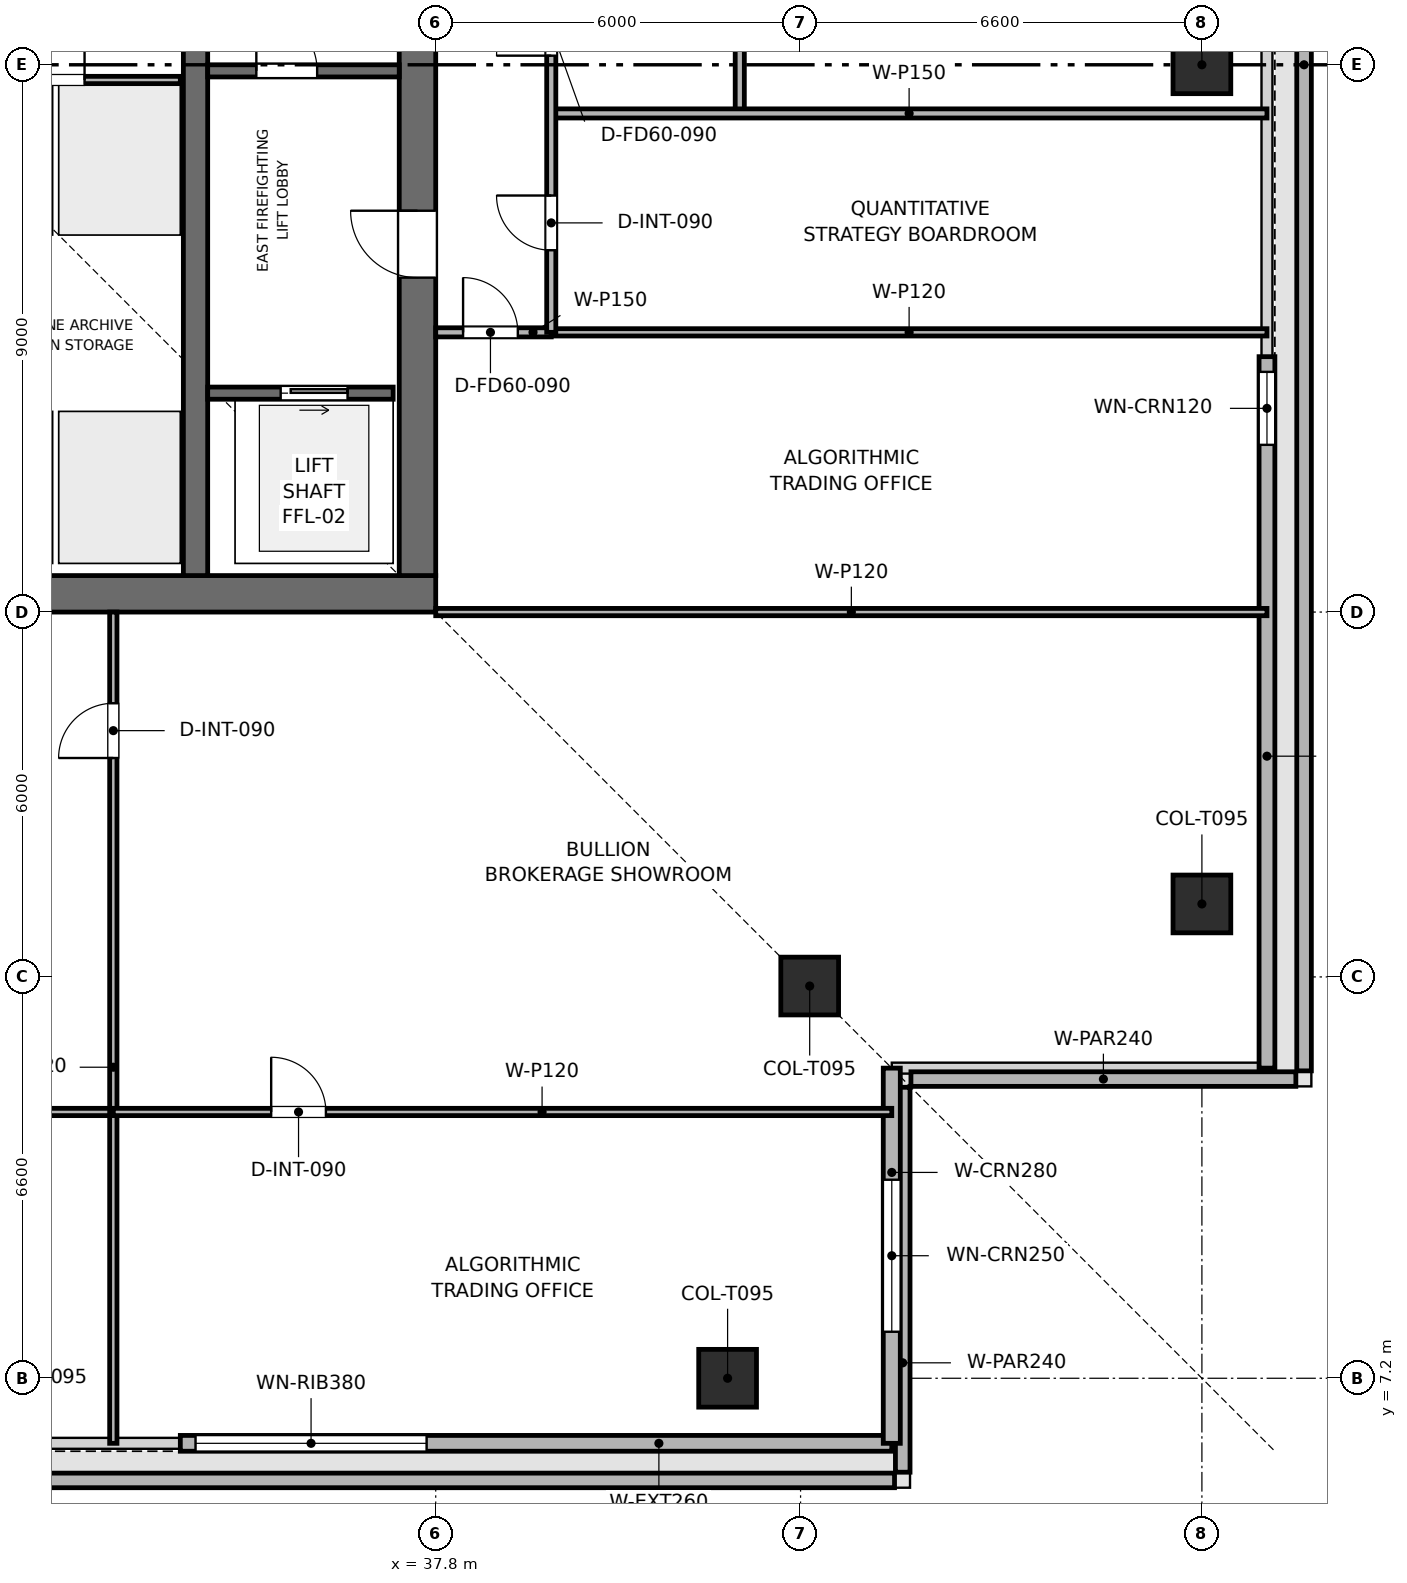
"""IFC4 building model, lengths in metres.
Left out: names, types, materials, properties, quantities, classifications, styles, units other than length and angle.
Written with IfcOpenShell. Run it as: python <this file> out.ifc"""

import sys

from ifc_helpers import new_model, si_unit, direction, frame, frame_2d, origin, origin_2d, place, context, subcontext, project, spatial, rectangle, extrude, element, fill, save


model = new_model("IFC4")
c1 = context("Model", 3, precision=1e-05, world=origin(), true_north=direction((0.0, 1.0)))
c2 = subcontext(c1, "Body", "Model", "MODEL_VIEW")
j1 = project(units=[si_unit("LENGTHUNIT", "METRE"), si_unit("PLANEANGLEUNIT", "RADIAN")], contexts=[c1])
p1 = place(None, origin())
s1 = spatial("IfcSite", under=j1, at=p1, CompositionType="ELEMENT")
p2 = place(p1, origin())
s2 = spatial("IfcBuilding", under=s1, at=p2, CompositionType="ELEMENT")
p3 = place(p2, frame((0.0, 0.0, 295.5)))
s3 = spatial("IfcBuildingStorey", under=s2, at=p3, CompositionType="ELEMENT", Elevation=295.5)
p4 = place(p3, frame((19.8, 20.1, 0.0), z_axis=(0.0, 0.0, 1.0), x_axis=(1.0, 0.0, 0.0)))
e1 = element("IfcWall", 1, at=p4, inside=s3, PredefinedType="SHEAR", context=c2, shape_type="SweptSolid", body=[
    extrude(rectangle(XDim=18.0, YDim=0.6, at=frame_2d((9.0, 0.0))), origin(), (0.0, 0.0, 1.0), 3.75),
])
p5 = place(p3, frame((37.5, 20.4, 0.0), z_axis=(0.0, 0.0, 1.0), x_axis=(0.0, 1.0, 0.0)))
e2 = element("IfcWall", 2, at=p5, inside=s3, PredefinedType="SHEAR", context=c2, shape_type="SweptSolid", body=[
    extrude(rectangle(XDim=16.8, YDim=0.6, at=frame_2d((8.4, 0.0))), origin(), (0.0, 0.0, 1.0), 3.75),
])
p6 = place(p5, frame((4.9, 0.0, 0.0)))
e3 = element("IfcOpeningElement", 3, at=p6, cuts=e2, PredefinedType="OPENING", context=c2, shape_type="SweptSolid", body=[
    extrude(rectangle(XDim=1.1, YDim=2.15, at=frame_2d((0.55, 1.075))), frame((0.0, 0.31, 0.0), z_axis=(0.0, -1.0, 0.0), x_axis=(1.0, 0.0, 0.0)), (0.0, 0.0, 1.0), 0.62),
])
p7 = place(p3, frame((33.85, 20.4, 0.0), z_axis=(0.0, 0.0, 1.0), x_axis=(0.0, 1.0, 0.0)))
e4 = element("IfcWall", 4, at=p7, inside=s3, PredefinedType="SHEAR", context=c2, shape_type="SweptSolid", body=[
    extrude(rectangle(XDim=16.8, YDim=0.4, at=frame_2d((8.4, 0.0))), origin(), (0.0, 0.0, 1.0), 3.75),
])
for number, where, z_axis, x_axis in (
    (5, (42.6, 7.2, 0.003), (0.0, 0.0, 1.0), (1.0, 0.0, 0.0)),
    (6, (50.4, 15.0, 0.003), (0.0, 0.0, 1.0), (1.0, 0.0, 0.0)),
    (7, (50.4, 28.8, 0.003), (0.0, 0.0, 1.0), (1.0, 0.0, 0.0)),
    (8, (43.95, 13.65, 0.003), (0.0, 0.0, 1.0), (1.0, 0.0, 0.0)),
):
    element("IfcColumn", number, at=place(p3, frame(where, z_axis=z_axis, x_axis=x_axis)), inside=s3, PredefinedType="COLUMN", context=c2, shape_type="SweptSolid", body=[
        extrude(rectangle(XDim=0.95, YDim=0.95, at=origin_2d()), origin(), (0.0, 0.0, 1.0), 3.504),
    ])
p8 = place(p3, frame((12.255, 5.52, 0.0), z_axis=(0.0, 0.0, 1.0), x_axis=(1.0, 0.0, 0.0)))
e9 = element("IfcWall", 9, at=p8, inside=s3, PredefinedType="PARAPET", context=c2, shape_type="SweptSolid", body=[
    extrude(rectangle(XDim=33.09, YDim=0.24, at=frame_2d((16.545, 0.0))), origin(), (0.0, 0.0, 1.0), 1.2),
])
for number, where, z_axis, x_axis in (
    (10, (45.48, 5.655, 0.0), (0.0, 0.0, 1.0), (0.0, 1.0, 0.0)),
    (11, (45.615, 12.12, 0.0), (0.0, 0.0, 1.0), (1.0, 0.0, 0.0)),
):
    element("IfcWall", number, at=place(p3, frame(where, z_axis=z_axis, x_axis=x_axis)), inside=s3, PredefinedType="PARAPET", context=c2, shape_type="SweptSolid", body=[
        extrude(rectangle(XDim=6.33, YDim=0.24, at=frame_2d((3.165, 0.0))), origin(), (0.0, 0.0, 1.0), 1.2),
    ])
p9 = place(p3, frame((52.08, 12.255, 0.0), z_axis=(0.0, 0.0, 1.0), x_axis=(0.0, 1.0, 0.0)))
e12 = element("IfcWall", 12, at=p9, inside=s3, PredefinedType="PARAPET", context=c2, shape_type="SweptSolid", body=[
    extrude(rectangle(XDim=33.09, YDim=0.24, at=frame_2d((16.545, 0.0))), origin(), (0.0, 0.0, 1.0), 1.2),
])
p10 = place(p3, frame((45.3, 6.13, 0.0), z_axis=(0.0, 0.0, 1.0), x_axis=(-1.0, 0.0, 0.0)))
e13 = element("IfcWall", 13, at=p10, inside=s3, PredefinedType="SOLIDWALL", context=c2, shape_type="SweptSolid", body=[
    extrude(rectangle(XDim=11.7, YDim=0.26, at=frame_2d((5.85, 0.0))), origin(), (0.0, 0.0, 1.0), 3.51),
])
p11 = place(p10, frame((7.65, 0.0, 0.9)))
e14 = element("IfcOpeningElement", 14, at=p11, cuts=e13, PredefinedType="OPENING", context=c2, shape_type="SweptSolid", body=[
    extrude(rectangle(XDim=3.8, YDim=1.9, at=frame_2d((1.9, 0.95))), frame((0.0, 0.14, 0.0), z_axis=(0.0, -1.0, 0.0), x_axis=(1.0, 0.0, 0.0)), (0.0, 0.0, 1.0), 0.28),
])
p12 = place(p3, frame((51.47, 24.0, 0.0), z_axis=(0.0, 0.0, 1.0), x_axis=(0.0, -1.0, 0.0)))
e15 = element("IfcWall", 15, at=p12, inside=s3, PredefinedType="SOLIDWALL", context=c2, shape_type="SweptSolid", body=[
    extrude(rectangle(XDim=11.7, YDim=0.26, at=frame_2d((5.85, 0.0))), origin(), (0.0, 0.0, 1.0), 3.51),
])
p13 = place(p12, frame((0.25, 0.0, 0.9)))
e16 = element("IfcOpeningElement", 16, at=p13, cuts=e15, PredefinedType="OPENING", context=c2, shape_type="SweptSolid", body=[
    extrude(rectangle(XDim=1.2, YDim=2.1, at=frame_2d((0.6, 1.05))), frame((0.0, 0.14, 0.0), z_axis=(0.0, -1.0, 0.0), x_axis=(1.0, 0.0, 0.0)), (0.0, 0.0, 1.0), 0.28),
])
p14 = place(p3, frame((45.3, 12.3, 0.0), z_axis=(0.0, 0.0, 1.0), x_axis=(0.0, -1.0, 0.0)))
e17 = element("IfcWall", 17, at=p14, inside=s3, PredefinedType="SOLIDWALL", context=c2, shape_type="SweptSolid", body=[
    extrude(rectangle(XDim=6.17, YDim=0.28, at=frame_2d((3.085, 0.0))), origin(), (0.0, 0.0, 1.0), 3.51),
])
p15 = place(p14, frame((1.835, 0.0, 0.9)))
e18 = element("IfcOpeningElement", 18, at=p15, cuts=e17, PredefinedType="OPENING", context=c2, shape_type="SweptSolid", body=[
    extrude(rectangle(XDim=2.5, YDim=1.9, at=frame_2d((1.25, 0.95))), frame((0.0, 0.15, 0.0), z_axis=(0.0, -1.0, 0.0), x_axis=(1.0, 0.0, 0.0)), (0.0, 0.0, 1.0), 0.3),
])
p16 = place(p3, frame((34.05, 28.7, 0.0), z_axis=(0.0, 0.0, 1.0), x_axis=(1.0, 0.0, 0.0)))
e19 = element("IfcWall", 19, at=p16, inside=s3, PredefinedType="SHEAR", context=c2, shape_type="SweptSolid", body=[
    extrude(rectangle(XDim=3.15, YDim=0.2, at=frame_2d((1.575, 0.0))), origin(), (0.0, 0.0, 1.0), 3.51),
])
p17 = place(p16, frame((0.8, 0.0, 0.0)))
e20 = element("IfcOpeningElement", 20, at=p17, cuts=e19, PredefinedType="OPENING", context=c2, shape_type="SweptSolid", body=[
    extrude(rectangle(XDim=1.0, YDim=2.1, at=frame_2d((0.5, 1.05))), frame((0.0, 0.11, 0.0), z_axis=(0.0, -1.0, 0.0), x_axis=(1.0, 0.0, 0.0)), (0.0, 0.0, 1.0), 0.22),
])
p18 = place(p3, frame((34.05, 23.4, 0.0), z_axis=(0.0, 0.0, 1.0), x_axis=(1.0, 0.0, 0.0)))
e21 = element("IfcWall", 21, at=p18, inside=s3, PredefinedType="SHEAR", context=c2, shape_type="SweptSolid", body=[
    extrude(rectangle(XDim=3.05, YDim=0.2, at=frame_2d((1.525, 0.0))), origin(), (0.0, 0.0, 1.0), 3.51),
])
p19 = place(p18, frame((1.2, 0.0, 0.0)))
e22 = element("IfcOpeningElement", 22, at=p19, cuts=e21, PredefinedType="OPENING", context=c2, shape_type="SweptSolid", body=[
    extrude(rectangle(XDim=1.1, YDim=2.15, at=frame_2d((0.55, 1.075))), frame((0.0, 0.11, 0.0), z_axis=(0.0, -1.0, 0.0), x_axis=(1.0, 0.0, 0.0)), (0.0, 0.0, 1.0), 0.22),
])
p20 = place(p3, frame((29.55, 28.55, 0.0), z_axis=(0.0, 0.0, 1.0), x_axis=(1.0, 0.0, 0.0)))
e23 = element("IfcWall", 23, at=p20, inside=s3, PredefinedType="PARTITIONING", context=c2, shape_type="SweptSolid", body=[
    extrude(rectangle(XDim=4.05, YDim=0.12, at=frame_2d((2.025, 0.0))), origin(), (0.0, 0.0, 1.0), 3.51),
])
p21 = place(p20, frame((1.575, 0.0, 0.0)))
e24 = element("IfcOpeningElement", 24, at=p21, cuts=e23, PredefinedType="OPENING", context=c2, shape_type="SweptSolid", body=[
    extrude(rectangle(XDim=0.9, YDim=2.1, at=frame_2d((0.45, 1.05))), frame((0.0, 0.07, 0.0), z_axis=(0.0, -1.0, 0.0), x_axis=(1.0, 0.0, 0.0)), (0.0, 0.0, 1.0), 0.14),
])
p22 = place(p3, frame((22.217, 11.579, 0.0), z_axis=(0.0, 0.0, 1.0), x_axis=(1.0, 0.0, 0.0)))
e25 = element("IfcWall", 25, at=p22, inside=s3, PredefinedType="PARTITIONING", context=c2, shape_type="SweptSolid", body=[
    extrude(rectangle(XDim=10.281, YDim=0.12, at=frame_2d((5.141, 0.0))), origin(), (0.0, 0.0, 1.0), 3.095),
])
p23 = place(p22, frame((0.2, 0.0, 0.0)))
e26 = element("IfcOpeningElement", 26, at=p23, cuts=e25, PredefinedType="OPENING", context=c2, shape_type="SweptSolid", body=[
    extrude(rectangle(XDim=0.9, YDim=2.1, at=frame_2d((0.45, 1.05))), frame((0.0, 0.07, 0.0), z_axis=(0.0, -1.0, 0.0), x_axis=(1.0, 0.0, 0.0)), (0.0, 0.0, 1.0), 0.14),
])
p24 = place(p3, frame((32.498, 6.13, 0.0), z_axis=(0.0, 0.0, 1.0), x_axis=(0.0, 1.0, 0.0)))
e27 = element("IfcWall", 27, at=p24, inside=s3, PredefinedType="PARTITIONING", context=c2, shape_type="SweptSolid", body=[
    extrude(rectangle(XDim=13.67, YDim=0.12, at=frame_2d((6.835, 0.0))), origin(), (0.0, 0.0, 1.0), 3.135),
])
p25 = place(p24, frame((11.27, 0.0, 0.0)))
e28 = element("IfcOpeningElement", 28, at=p25, cuts=e27, PredefinedType="OPENING", context=c2, shape_type="SweptSolid", body=[
    extrude(rectangle(XDim=0.9, YDim=2.1, at=frame_2d((0.45, 1.05))), frame((0.0, 0.07, 0.0), z_axis=(0.0, -1.0, 0.0), x_axis=(1.0, 0.0, 0.0)), (0.0, 0.0, 1.0), 0.14),
])
p26 = place(p3, frame((32.498, 11.579, 0.0), z_axis=(0.0, 0.0, 1.0), x_axis=(1.0, 0.0, 0.0)))
e29 = element("IfcWall", 29, at=p26, inside=s3, PredefinedType="PARTITIONING", context=c2, shape_type="SweptSolid", body=[
    extrude(rectangle(XDim=12.802, YDim=0.12, at=frame_2d((6.401, 0.0))), origin(), (0.0, 0.0, 1.0), 3.095),
])
p27 = place(p26, frame((2.596, 0.0, 0.0)))
e30 = element("IfcOpeningElement", 30, at=p27, cuts=e29, PredefinedType="OPENING", context=c2, shape_type="SweptSolid", body=[
    extrude(rectangle(XDim=0.9, YDim=2.1, at=frame_2d((0.45, 1.05))), frame((0.0, 0.07, 0.0), z_axis=(0.0, -1.0, 0.0), x_axis=(1.0, 0.0, 0.0)), (0.0, 0.0, 1.0), 0.14),
])
p28 = place(p3, frame((37.8, 19.8, 0.0), z_axis=(0.0, 0.0, 1.0), x_axis=(1.0, 0.0, 0.0)))
e31 = element("IfcWall", 31, at=p28, inside=s3, PredefinedType="PARTITIONING", context=c2, shape_type="SweptSolid", body=[
    extrude(rectangle(XDim=13.67, YDim=0.12, at=frame_2d((6.835, 0.0))), origin(), (0.0, 0.0, 1.0), 3.095),
])
p29 = place(p3, frame((37.8, 24.4, 0.0), z_axis=(0.0, 0.0, 1.0), x_axis=(1.0, 0.0, 0.0)))
e32 = element("IfcWall", 32, at=p29, inside=s3, PredefinedType="PARTITIONING", context=c2, shape_type="SweptSolid", body=[
    extrude(rectangle(XDim=1.9, YDim=0.15, at=frame_2d((0.95, 0.0))), origin(), (0.0, 0.0, 1.0), 3.51),
])
p30 = place(p29, frame((0.45, 0.0, 0.0)))
e33 = element("IfcOpeningElement", 33, at=p30, cuts=e32, PredefinedType="OPENING", context=c2, shape_type="SweptSolid", body=[
    extrude(rectangle(XDim=0.9, YDim=2.1, at=frame_2d((0.45, 1.05))), frame((0.0, 0.085, 0.0), z_axis=(0.0, -1.0, 0.0), x_axis=(1.0, 0.0, 0.0)), (0.0, 0.0, 1.0), 0.17),
])
p31 = place(p3, frame((39.7, 24.4, 0.0), z_axis=(0.0, 0.0, 1.0), x_axis=(1.0, 0.0, 0.0)))
e34 = element("IfcWall", 34, at=p31, inside=s3, PredefinedType="PARTITIONING", context=c2, shape_type="SweptSolid", body=[
    extrude(rectangle(XDim=11.77, YDim=0.12, at=frame_2d((5.885, 0.0))), origin(), (0.0, 0.0, 1.0), 3.135),
])
p32 = place(p3, frame((42.8, 28.0, 0.0), z_axis=(0.0, 0.0, 1.0), x_axis=(0.0, 1.0, 0.0)))
e35 = element("IfcWall", 35, at=p32, inside=s3, PredefinedType="PARTITIONING", context=c2, shape_type="SweptSolid", body=[
    extrude(rectangle(XDim=11.7, YDim=0.15, at=frame_2d((5.85, 0.0))), origin(), (0.0, 0.0, 1.0), 3.095),
])
p33 = place(p32, frame((9.6, 0.0, 0.0)))
e36 = element("IfcOpeningElement", 36, at=p33, cuts=e35, PredefinedType="OPENING", context=c2, shape_type="SweptSolid", body=[
    extrude(rectangle(XDim=0.9, YDim=2.1, at=frame_2d((0.45, 1.05))), frame((0.0, 0.085, 0.0), z_axis=(0.0, -1.0, 0.0), x_axis=(1.0, 0.0, 0.0)), (0.0, 0.0, 1.0), 0.17),
])
p34 = place(p3, frame((39.7, 28.0, 0.0), z_axis=(0.0, 0.0, 1.0), x_axis=(1.0, 0.0, 0.0)))
e37 = element("IfcWall", 37, at=p34, inside=s3, PredefinedType="PARTITIONING", context=c2, shape_type="SweptSolid", body=[
    extrude(rectangle(XDim=11.77, YDim=0.15, at=frame_2d((5.885, 0.0))), origin(), (0.0, 0.0, 1.0), 3.135),
])
p35 = place(p3, frame((39.7, 24.4, 0.0), z_axis=(0.0, 0.0, 1.0), x_axis=(0.0, 1.0, 0.0)))
e38 = element("IfcWall", 38, at=p35, inside=s3, PredefinedType="PARTITIONING", context=c2, shape_type="SweptSolid", body=[
    extrude(rectangle(XDim=15.3, YDim=0.15, at=frame_2d((7.65, 0.0))), origin(), (0.0, 0.0, 1.0), 3.095),
])
p36 = place(p35, frame((1.35, 0.0, 0.0)))
e39 = element("IfcOpeningElement", 39, at=p36, cuts=e38, PredefinedType="OPENING", context=c2, shape_type="SweptSolid", body=[
    extrude(rectangle(XDim=0.9, YDim=2.1, at=frame_2d((0.45, 1.05))), frame((0.0, 0.085, 0.0), z_axis=(0.0, -1.0, 0.0), x_axis=(1.0, 0.0, 0.0)), (0.0, 0.0, 1.0), 0.17),
])
p37 = place(p35, frame((4.55, 0.0, 0.0)))
e40 = element("IfcOpeningElement", 40, at=p37, cuts=e38, PredefinedType="OPENING", context=c2, shape_type="SweptSolid", body=[
    extrude(rectangle(XDim=0.9, YDim=2.1, at=frame_2d((0.45, 1.05))), frame((0.0, 0.085, 0.0), z_axis=(0.0, -1.0, 0.0), x_axis=(1.0, 0.0, 0.0)), (0.0, 0.0, 1.0), 0.17),
])
p38 = place(p35, frame((7.45, 0.0, 0.0)))
e41 = element("IfcOpeningElement", 41, at=p38, cuts=e38, PredefinedType="OPENING", context=c2, shape_type="SweptSolid", body=[
    extrude(rectangle(XDim=0.9, YDim=2.1, at=frame_2d((0.45, 1.05))), frame((0.0, 0.085, 0.0), z_axis=(0.0, -1.0, 0.0), x_axis=(1.0, 0.0, 0.0)), (0.0, 0.0, 1.0), 0.17),
])
p39 = place(p35, frame((10.2, 0.0, 0.0)))
e42 = element("IfcOpeningElement", 42, at=p39, cuts=e38, PredefinedType="OPENING", context=c2, shape_type="SweptSolid", body=[
    extrude(rectangle(XDim=0.95, YDim=2.1, at=frame_2d((0.475, 1.05))), frame((0.0, 0.085, 0.0), z_axis=(0.0, -1.0, 0.0), x_axis=(1.0, 0.0, 0.0)), (0.0, 0.0, 1.0), 0.17),
])
p40 = place(p35, frame((13.2, 0.0, 0.0)))
e43 = element("IfcOpeningElement", 43, at=p40, cuts=e38, PredefinedType="OPENING", context=c2, shape_type="SweptSolid", body=[
    extrude(rectangle(XDim=0.9, YDim=2.1, at=frame_2d((0.45, 1.05))), frame((0.0, 0.085, 0.0), z_axis=(0.0, -1.0, 0.0), x_axis=(1.0, 0.0, 0.0)), (0.0, 0.0, 1.0), 0.17),
])
p41 = place(p11, origin())
e44 = element("IfcWindow", 44, at=p41, inside=s3, PartitioningType="SINGLE_PANEL", PredefinedType="WINDOW", context=c2, shape_type="SweptSolid", body=[
    extrude(rectangle(XDim=3.8, YDim=1.9, at=frame_2d((1.9, 0.95))), frame((0.0, 0.03, 0.0), z_axis=(0.0, -1.0, 0.0), x_axis=(1.0, 0.0, 0.0)), (0.0, 0.0, 1.0), 0.06),
])
fill(e14, e44)
p42 = place(p13, origin())
e45 = element("IfcWindow", 45, at=p42, inside=s3, PartitioningType="SINGLE_PANEL", PredefinedType="WINDOW", context=c2, shape_type="SweptSolid", body=[
    extrude(rectangle(XDim=1.2, YDim=2.1, at=frame_2d((0.6, 1.05))), frame((0.0, 0.03, 0.0), z_axis=(0.0, -1.0, 0.0), x_axis=(1.0, 0.0, 0.0)), (0.0, 0.0, 1.0), 0.06),
])
fill(e16, e45)
p43 = place(p15, origin())
e46 = element("IfcWindow", 46, at=p43, inside=s3, PartitioningType="SINGLE_PANEL", PredefinedType="WINDOW", context=c2, shape_type="SweptSolid", body=[
    extrude(rectangle(XDim=2.5, YDim=1.9, at=frame_2d((1.25, 0.95))), frame((0.0, 0.03, 0.0), z_axis=(0.0, -1.0, 0.0), x_axis=(1.0, 0.0, 0.0)), (0.0, 0.0, 1.0), 0.06),
])
fill(e18, e46)
p44 = place(p17, origin())
e47 = element("IfcDoor", 47, at=p44, inside=s3, OperationType="SINGLE_SWING_LEFT", PredefinedType="DOOR", context=c2, shape_type="SweptSolid", body=[
    extrude(rectangle(XDim=1.0, YDim=2.1, at=frame_2d((0.5, 1.05))), frame((0.0, 0.025, 0.0), z_axis=(0.0, -1.0, 0.0), x_axis=(1.0, 0.0, 0.0)), (0.0, 0.0, 1.0), 0.05),
])
fill(e20, e47)
p45 = place(p19, origin())
e48 = element("IfcDoor", 48, at=p45, inside=s3, OperationType="SLIDING_TO_RIGHT", PredefinedType="DOOR", context=c2, shape_type="SweptSolid", body=[
    extrude(rectangle(XDim=1.1, YDim=2.15, at=frame_2d((0.55, 1.075))), frame((0.0, 0.025, 0.0), z_axis=(0.0, -1.0, 0.0), x_axis=(1.0, 0.0, 0.0)), (0.0, 0.0, 1.0), 0.05),
])
fill(e22, e48)
p46 = place(p21, origin())
e49 = element("IfcDoor", 49, at=p46, inside=s3, OperationType="SINGLE_SWING_RIGHT", PredefinedType="DOOR", context=c2, shape_type="SweptSolid", body=[
    extrude(rectangle(XDim=0.9, YDim=2.1, at=frame_2d((0.45, 1.05))), frame((0.0, 0.025, 0.0), z_axis=(0.0, -1.0, 0.0), x_axis=(1.0, 0.0, 0.0)), (0.0, 0.0, 1.0), 0.05),
])
fill(e24, e49)
p47 = place(p25, origin())
e50 = element("IfcDoor", 50, at=p47, inside=s3, OperationType="SINGLE_SWING_LEFT", PredefinedType="DOOR", context=c2, shape_type="SweptSolid", body=[
    extrude(rectangle(XDim=0.9, YDim=2.1, at=frame_2d((0.45, 1.05))), frame((0.0, 0.025, 0.0), z_axis=(0.0, -1.0, 0.0), x_axis=(1.0, 0.0, 0.0)), (0.0, 0.0, 1.0), 0.05),
])
fill(e28, e50)
p48 = place(p27, origin())
e51 = element("IfcDoor", 51, at=p48, inside=s3, OperationType="SINGLE_SWING_LEFT", PredefinedType="DOOR", context=c2, shape_type="SweptSolid", body=[
    extrude(rectangle(XDim=0.9, YDim=2.1, at=frame_2d((0.45, 1.05))), frame((0.0, 0.025, 0.0), z_axis=(0.0, -1.0, 0.0), x_axis=(1.0, 0.0, 0.0)), (0.0, 0.0, 1.0), 0.05),
])
fill(e30, e51)
p49 = place(p30, origin())
e52 = element("IfcDoor", 52, at=p49, inside=s3, OperationType="SINGLE_SWING_LEFT", PredefinedType="DOOR", context=c2, shape_type="SweptSolid", body=[
    extrude(rectangle(XDim=0.9, YDim=2.1, at=frame_2d((0.45, 1.05))), frame((0.0, 0.025, 0.0), z_axis=(0.0, -1.0, 0.0), x_axis=(1.0, 0.0, 0.0)), (0.0, 0.0, 1.0), 0.05),
])
fill(e33, e52)
p50 = place(p36, origin())
e53 = element("IfcDoor", 53, at=p50, inside=s3, OperationType="SINGLE_SWING_RIGHT", PredefinedType="DOOR", context=c2, shape_type="SweptSolid", body=[
    extrude(rectangle(XDim=0.9, YDim=2.1, at=frame_2d((0.45, 1.05))), frame((0.0, 0.025, 0.0), z_axis=(0.0, -1.0, 0.0), x_axis=(1.0, 0.0, 0.0)), (0.0, 0.0, 1.0), 0.05),
])
fill(e39, e53)
p51 = place(p37, origin())
e54 = element("IfcDoor", 54, at=p51, inside=s3, OperationType="SINGLE_SWING_LEFT", PredefinedType="DOOR", context=c2, shape_type="SweptSolid", body=[
    extrude(rectangle(XDim=0.9, YDim=2.1, at=frame_2d((0.45, 1.05))), frame((0.0, 0.025, 0.0), z_axis=(0.0, -1.0, 0.0), x_axis=(1.0, 0.0, 0.0)), (0.0, 0.0, 1.0), 0.05),
])
fill(e40, e54)
p52 = place(p6, origin())
e55 = element("IfcDoor", 55, at=p52, inside=s3, OperationType="SINGLE_SWING_RIGHT", PredefinedType="DOOR", context=c2, shape_type="SweptSolid", body=[
    extrude(rectangle(XDim=1.1, YDim=2.15, at=frame_2d((0.55, 1.075))), frame((0.0, 0.025, 0.0), z_axis=(0.0, -1.0, 0.0), x_axis=(1.0, 0.0, 0.0)), (0.0, 0.0, 1.0), 0.05),
])
fill(e3, e55)
save(model, sys.argv[1])
